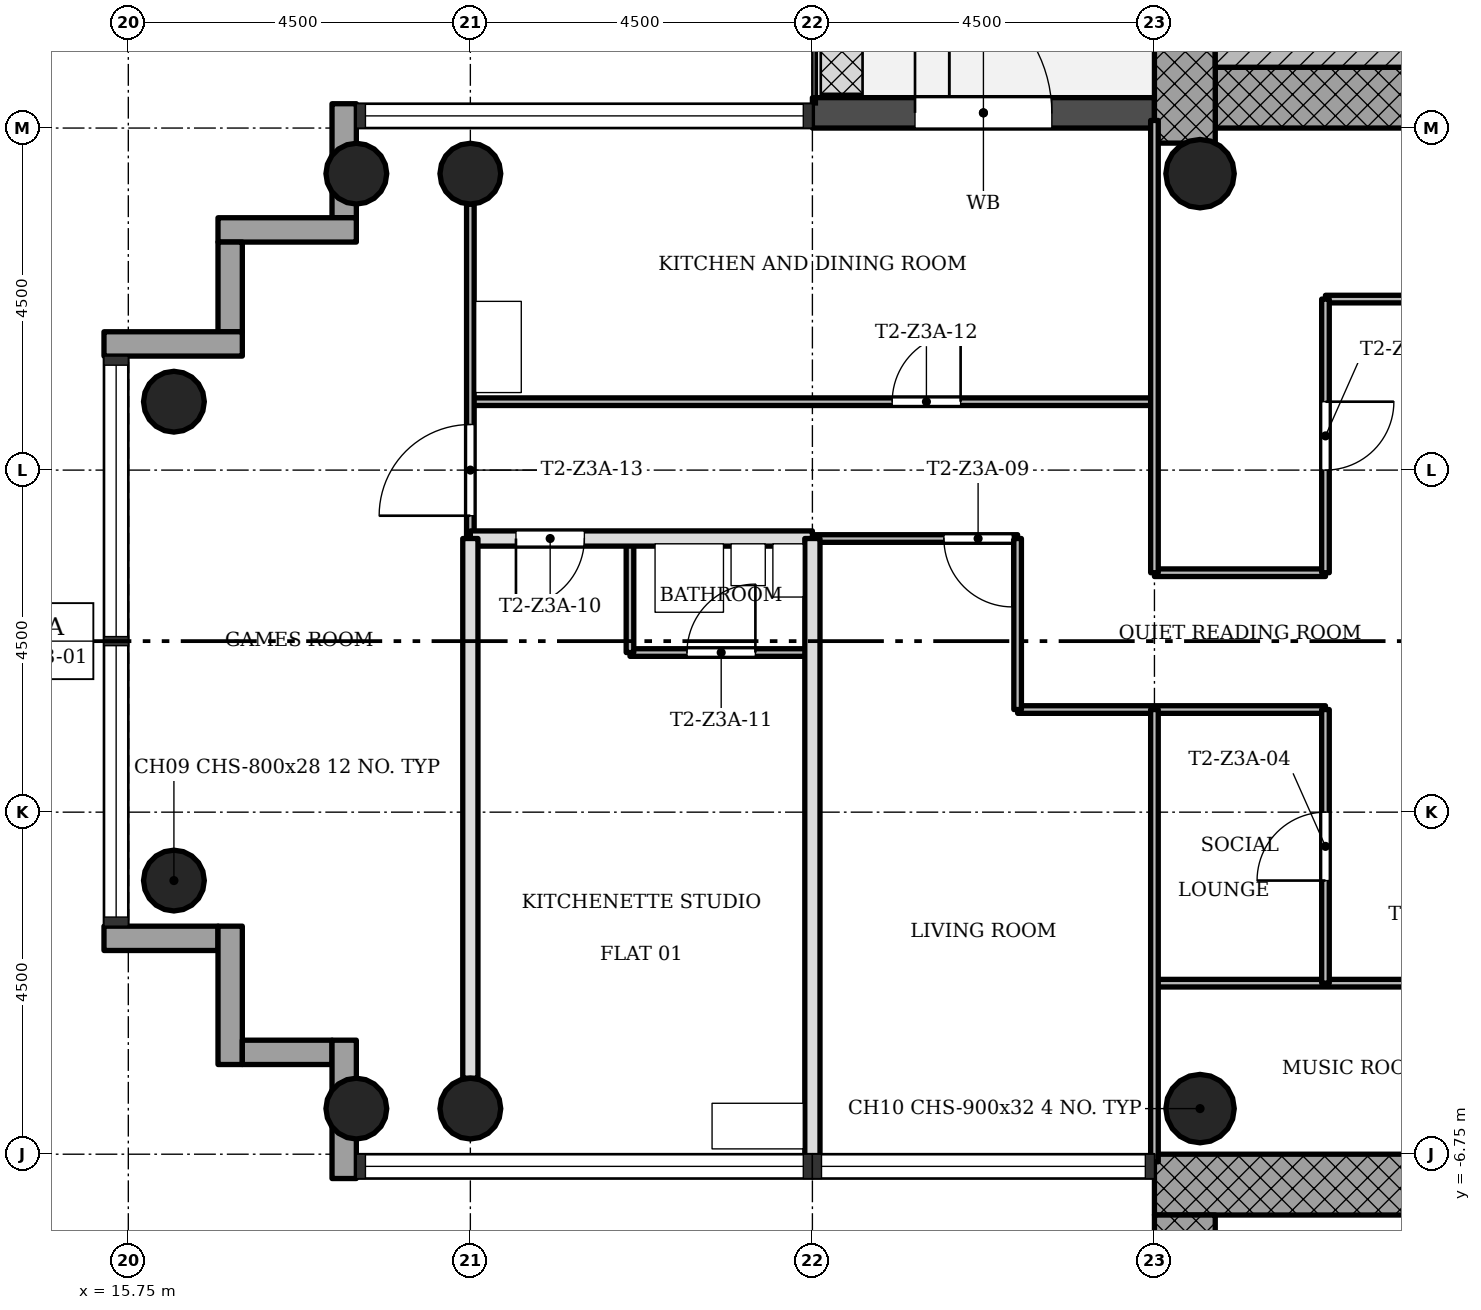
"""IFC4 building model, lengths in metres.
Left out: names, types, materials, properties, quantities, classifications, styles, units other than length and angle.
Written with IfcOpenShell. Run it as: python <this file> out.ifc"""

import sys

from ifc_helpers import new_model, si_unit, direction, frame, frame_2d, origin, origin_2d, place, context, subcontext, project, spatial, rectangle, hollow_circle, extrude, element, fill, save


model = new_model("IFC4")
c1 = context("Model", 3, precision=1e-05, world=origin(), true_north=direction((0.0, 1.0)))
c2 = subcontext(c1, "Body", "Model", "MODEL_VIEW")
j1 = project(units=[si_unit("LENGTHUNIT", "METRE"), si_unit("PLANEANGLEUNIT", "RADIAN")], contexts=[c1])
p1 = place(None, origin())
s1 = spatial("IfcSite", under=j1, at=p1, CompositionType="ELEMENT")
p2 = place(p1, origin())
s2 = spatial("IfcBuilding", under=s1, at=p2, CompositionType="ELEMENT")
p3 = place(p2, frame((0.0, 0.0, 140.5)))
s3 = spatial("IfcBuildingStorey", under=s2, at=p3, CompositionType="ELEMENT", Elevation=140.5)
p4 = place(p3, frame((30.05, 7.15, 0.0), z_axis=(0.0, 0.0, 1.0), x_axis=(1.0, 0.0, 0.0)))
e1 = element("IfcWall", 1, at=p4, inside=s3, PredefinedType="SHEAR", context=c2, shape_type="SweptSolid", body=[
    extrude(rectangle(XDim=12.7, YDim=0.8, at=frame_2d((6.35, 0.0))), origin(), (0.0, 0.0, 1.0), 3.4),
])
p5 = place(p4, frame((5.05, 0.0, 0.0)))
e2 = element("IfcOpeningElement", 2, at=p5, cuts=e1, PredefinedType="OPENING", context=c2, shape_type="SweptSolid", body=[
    extrude(rectangle(XDim=1.8, YDim=2.1, at=frame_2d((0.9, 1.05))), frame((0.0, 0.41, 0.0), z_axis=(0.0, -1.0, 0.0), x_axis=(1.0, 0.0, 0.0)), (0.0, 0.0, 1.0), 0.82),
])
p6 = place(p3, frame((29.65, 15.348, 0.0), z_axis=(0.0, 0.0, 1.0), x_axis=(0.0, -1.0, 0.0)))
e3 = element("IfcWall", 3, at=p6, inside=s3, PredefinedType="SHEAR", context=c2, shape_type="SweptSolid", body=[
    extrude(rectangle(XDim=8.796, YDim=0.8, at=frame_2d((4.398, 0.0))), origin(), (0.0, 0.0, 1.0), 3.4),
])
p7 = place(p3, frame((41.95, -7.15, 0.0), z_axis=(0.0, 0.0, 1.0), x_axis=(-1.0, 0.0, 0.0)))
e4 = element("IfcWall", 4, at=p7, inside=s3, PredefinedType="SHEAR", context=c2, shape_type="SweptSolid", body=[
    extrude(rectangle(XDim=12.7, YDim=0.8, at=frame_2d((6.35, 0.0))), origin(), (0.0, 0.0, 1.0), 3.4),
])
p8 = place(p7, frame((5.05, 0.0, 0.0)))
e5 = element("IfcOpeningElement", 5, at=p8, cuts=e4, PredefinedType="OPENING", context=c2, shape_type="SweptSolid", body=[
    extrude(rectangle(XDim=1.8, YDim=2.1, at=frame_2d((0.9, 1.05))), frame((0.0, 0.41, 0.0), z_axis=(0.0, -1.0, 0.0), x_axis=(1.0, 0.0, 0.0)), (0.0, 0.0, 1.0), 0.82),
])
p9 = place(p3, frame((29.65, -7.55, 0.0), z_axis=(0.0, 0.0, 1.0), x_axis=(0.0, -1.0, 0.0)))
e6 = element("IfcWall", 6, at=p9, inside=s3, PredefinedType="SHEAR", context=c2, shape_type="SweptSolid", body=[
    extrude(rectangle(XDim=8.2, YDim=0.8, at=frame_2d((4.1, 0.0))), origin(), (0.0, 0.0, 1.0), 3.4),
])
for number, where, z_axis, x_axis in (
    (7, (20.25, 6.15, 0.0), (0.0, 0.0, 1.0), (1.0, 0.0, 0.0)),
    (8, (20.25, -6.15, 0.0), (0.0, 0.0, 1.0), (1.0, 0.0, 0.0)),
    (9, (18.75, 6.15, 0.0), (0.0, 0.0, 1.0), (1.0, 0.0, 0.0)),
    (10, (18.75, -6.15, 0.0), (0.0, 0.0, 1.0), (1.0, 0.0, 0.0)),
    (11, (16.35, 3.15, 0.0), (0.0, 0.0, 1.0), (1.0, 0.0, 0.0)),
    (12, (16.35, -3.15, 0.0), (0.0, 0.0, 1.0), (1.0, 0.0, 0.0)),
):
    element("IfcColumn", number, at=place(p3, frame(where, z_axis=z_axis, x_axis=x_axis)), inside=s3, PredefinedType="COLUMN", context=c2, shape_type="SweptSolid", body=[
        extrude(hollow_circle(Radius=0.4, WallThickness=0.028, at=origin_2d()), origin(), (0.0, 0.0, 1.0), 3.4),
    ])
for number, where, z_axis, x_axis in (
    (13, (29.85, 6.15, 0.0), (0.0, 0.0, 1.0), (1.0, 0.0, 0.0)),
    (14, (29.85, -6.15, 0.0), (0.0, 0.0, 1.0), (1.0, 0.0, 0.0)),
):
    element("IfcColumn", number, at=place(p3, frame(where, z_axis=z_axis, x_axis=x_axis)), inside=s3, PredefinedType="COLUMN", context=c2, shape_type="SweptSolid", body=[
        extrude(hollow_circle(Radius=0.45, WallThickness=0.032, at=origin_2d()), origin(), (0.0, 0.0, 1.0), 3.4),
    ])
p10 = place(p3, frame((29.25, 6.95, -0.02), z_axis=(0.0, 0.0, 1.0), x_axis=(-1.0, 0.0, 0.0)))
e15 = element("IfcWall", 15, at=p10, inside=s3, PredefinedType="STANDARD", context=c2, shape_type="SweptSolid", body=[
    extrude(rectangle(XDim=4.5, YDim=0.4, at=frame_2d((2.25, 0.0))), origin(), (0.0, 0.0, 1.0), 3.12),
])
p11 = place(p10, frame((1.35, 0.0, 0.02)))
e16 = element("IfcOpeningElement", 16, at=p11, cuts=e15, PredefinedType="OPENING", context=c2, shape_type="SweptSolid", body=[
    extrude(rectangle(XDim=1.8, YDim=2.1, at=frame_2d((0.9, 1.05))), frame((0.0, 0.21, 0.0), z_axis=(0.0, -1.0, 0.0), x_axis=(1.0, 0.0, 0.0)), (0.0, 0.0, 1.0), 0.42),
])
p12 = place(p3, frame((18.59, 7.07, -0.3), z_axis=(0.0, 0.0, 1.0), x_axis=(0.0, -1.0, 0.0)))
e17 = element("IfcWall", 17, at=p12, inside=s3, PredefinedType="STANDARD", context=c2, shape_type="SweptSolid", body=[
    extrude(rectangle(XDim=1.5, YDim=0.32, at=frame_2d((0.75, 0.0))), origin(), (0.0, 0.0, 1.0), 3.4),
])
p13 = place(p3, frame((18.75, 5.41, -0.3), z_axis=(0.0, 0.0, 1.0), x_axis=(-1.0, 0.0, 0.0)))
e18 = element("IfcWall", 18, at=p13, inside=s3, PredefinedType="STANDARD", context=c2, shape_type="SweptSolid", body=[
    extrude(rectangle(XDim=1.82, YDim=0.32, at=frame_2d((0.91, 0.0))), origin(), (0.0, 0.0, 1.0), 3.4),
])
p14 = place(p3, frame((17.09, 5.25, -0.3), z_axis=(0.0, 0.0, 1.0), x_axis=(0.0, -1.0, 0.0)))
e19 = element("IfcWall", 19, at=p14, inside=s3, PredefinedType="STANDARD", context=c2, shape_type="SweptSolid", body=[
    extrude(rectangle(XDim=1.18, YDim=0.32, at=frame_2d((0.59, 0.0))), origin(), (0.0, 0.0, 1.0), 3.4),
])
p15 = place(p3, frame((17.25, 3.91, -0.3), z_axis=(0.0, 0.0, 1.0), x_axis=(-1.0, 0.0, 0.0)))
e20 = element("IfcWall", 20, at=p15, inside=s3, PredefinedType="STANDARD", context=c2, shape_type="SweptSolid", body=[
    extrude(rectangle(XDim=1.82, YDim=0.32, at=frame_2d((0.91, 0.0))), origin(), (0.0, 0.0, 1.0), 3.4),
])
p16 = place(p3, frame((15.43, -3.91, -0.3), z_axis=(0.0, 0.0, 1.0), x_axis=(1.0, 0.0, 0.0)))
e21 = element("IfcWall", 21, at=p16, inside=s3, PredefinedType="STANDARD", context=c2, shape_type="SweptSolid", body=[
    extrude(rectangle(XDim=1.5, YDim=0.32, at=frame_2d((0.75, 0.0))), origin(), (0.0, 0.0, 1.0), 3.4),
])
p17 = place(p3, frame((17.09, -3.75, -0.3), z_axis=(0.0, 0.0, 1.0), x_axis=(0.0, -1.0, 0.0)))
e22 = element("IfcWall", 22, at=p17, inside=s3, PredefinedType="STANDARD", context=c2, shape_type="SweptSolid", body=[
    extrude(rectangle(XDim=1.82, YDim=0.32, at=frame_2d((0.91, 0.0))), origin(), (0.0, 0.0, 1.0), 3.4),
])
p18 = place(p3, frame((17.25, -5.41, -0.3), z_axis=(0.0, 0.0, 1.0), x_axis=(1.0, 0.0, 0.0)))
e23 = element("IfcWall", 23, at=p18, inside=s3, PredefinedType="STANDARD", context=c2, shape_type="SweptSolid", body=[
    extrude(rectangle(XDim=1.18, YDim=0.32, at=frame_2d((0.59, 0.0))), origin(), (0.0, 0.0, 1.0), 3.4),
])
p19 = place(p3, frame((18.59, -5.25, -0.3), z_axis=(0.0, 0.0, 1.0), x_axis=(0.0, -1.0, 0.0)))
e24 = element("IfcWall", 24, at=p19, inside=s3, PredefinedType="STANDARD", context=c2, shape_type="SweptSolid", body=[
    extrude(rectangle(XDim=1.82, YDim=0.32, at=frame_2d((0.91, 0.0))), origin(), (0.0, 0.0, 1.0), 3.4),
])
p20 = place(p3, frame((34.5, -4.5, 0.0), z_axis=(0.0, 0.0, 1.0), x_axis=(-1.0, 0.0, 0.0)))
e25 = element("IfcWall", 25, at=p20, inside=s3, PredefinedType="PARTITIONING", context=c2, shape_type="SweptSolid", body=[
    extrude(rectangle(XDim=5.25, YDim=0.1, at=frame_2d((2.625, 0.0))), origin(), (0.0, 0.0, 1.0), 3.0),
])
p21 = place(p20, frame((1.05, 0.0, 0.0)))
e26 = element("IfcOpeningElement", 26, at=p21, cuts=e25, PredefinedType="OPENING", context=c2, shape_type="SweptSolid", body=[
    extrude(rectangle(XDim=0.9, YDim=2.1, at=frame_2d((0.45, 1.05))), frame((0.0, 0.06, 0.0), z_axis=(0.0, -1.0, 0.0), x_axis=(1.0, 0.0, 0.0)), (0.0, 0.0, 1.0), 0.12),
])
p22 = place(p3, frame((31.5, -0.9, 0.0), z_axis=(0.0, 0.0, 1.0), x_axis=(-1.0, 0.0, 0.0)))
e27 = element("IfcWall", 27, at=p22, inside=s3, PredefinedType="PARTITIONING", context=c2, shape_type="SweptSolid", body=[
    extrude(rectangle(XDim=4.05, YDim=0.1, at=frame_2d((2.025, 0.0))), origin(), (0.0, 0.0, 1.0), 3.0),
])
p23 = place(p3, frame((24.75, -0.15, 0.0), z_axis=(0.0, 0.0, 1.0), x_axis=(-1.0, 0.0, 0.0)))
e28 = element("IfcWall", 28, at=p23, inside=s3, PredefinedType="PARTITIONING", context=c2, shape_type="SweptSolid", body=[
    extrude(rectangle(XDim=2.4, YDim=0.1, at=frame_2d((1.2, 0.0))), origin(), (0.0, 0.0, 1.0), 3.0),
])
p24 = place(p23, frame((0.75, 0.0, 0.0)))
e29 = element("IfcOpeningElement", 29, at=p24, cuts=e28, PredefinedType="OPENING", context=c2, shape_type="SweptSolid", body=[
    extrude(rectangle(XDim=0.9, YDim=2.1, at=frame_2d((0.45, 1.05))), frame((0.0, 0.06, 0.0), z_axis=(0.0, -1.0, 0.0), x_axis=(1.0, 0.0, 0.0)), (0.0, 0.0, 1.0), 0.12),
])
p25 = place(p3, frame((31.5, 0.9, 0.0), z_axis=(0.0, 0.0, 1.0), x_axis=(-1.0, 0.0, 0.0)))
e30 = element("IfcWall", 30, at=p25, inside=s3, PredefinedType="PARTITIONING", context=c2, shape_type="SweptSolid", body=[
    extrude(rectangle(XDim=2.25, YDim=0.1, at=frame_2d((1.125, 0.0))), origin(), (0.0, 0.0, 1.0), 3.0),
])
p26 = place(p3, frame((27.45, 1.35, 0.0), z_axis=(0.0, 0.0, 1.0), x_axis=(-1.0, 0.0, 0.0)))
e31 = element("IfcWall", 31, at=p26, inside=s3, PredefinedType="PARTITIONING", context=c2, shape_type="SweptSolid", body=[
    extrude(rectangle(XDim=2.7, YDim=0.1, at=frame_2d((1.35, 0.0))), origin(), (0.0, 0.0, 1.0), 3.0),
])
p27 = place(p26, frame((0.07, 0.0, 0.0)))
e32 = element("IfcOpeningElement", 32, at=p27, cuts=e31, PredefinedType="OPENING", context=c2, shape_type="SweptSolid", body=[
    extrude(rectangle(XDim=0.9, YDim=2.1, at=frame_2d((0.45, 1.05))), frame((0.0, 0.06, 0.0), z_axis=(0.0, -1.0, 0.0), x_axis=(1.0, 0.0, 0.0)), (0.0, 0.0, 1.0), 0.12),
])
p28 = place(p3, frame((24.75, 1.35, 0.0), z_axis=(0.0, 0.0, 1.0), x_axis=(-1.0, 0.0, 0.0)))
e33 = element("IfcWall", 33, at=p28, inside=s3, PredefinedType="SOLIDWALL", context=c2, shape_type="SweptSolid", body=[
    extrude(rectangle(XDim=4.5, YDim=0.2, at=frame_2d((2.25, 0.0))), origin(), (0.0, 0.0, 1.0), 3.0),
])
p29 = place(p28, frame((3.0, 0.0, 0.0)))
e34 = element("IfcOpeningElement", 34, at=p29, cuts=e33, PredefinedType="OPENING", context=c2, shape_type="SweptSolid", body=[
    extrude(rectangle(XDim=0.9, YDim=2.1, at=frame_2d((0.45, 1.05))), frame((0.0, 0.11, 0.0), z_axis=(0.0, -1.0, 0.0), x_axis=(1.0, 0.0, 0.0)), (0.0, 0.0, 1.0), 0.22),
])
p30 = place(p3, frame((29.25, 3.15, 0.0), z_axis=(0.0, 0.0, 1.0), x_axis=(-1.0, 0.0, 0.0)))
e35 = element("IfcWall", 35, at=p30, inside=s3, PredefinedType="PARTITIONING", context=c2, shape_type="SweptSolid", body=[
    extrude(rectangle(XDim=9.0, YDim=0.1, at=frame_2d((4.5, 0.0))), origin(), (0.0, 0.0, 1.0), 3.0),
])
p31 = place(p30, frame((2.55, 0.0, 0.0)))
e36 = element("IfcOpeningElement", 36, at=p31, cuts=e35, PredefinedType="OPENING", context=c2, shape_type="SweptSolid", body=[
    extrude(rectangle(XDim=0.9, YDim=2.1, at=frame_2d((0.45, 1.05))), frame((0.0, 0.06, 0.0), z_axis=(0.0, -1.0, 0.0), x_axis=(1.0, 0.0, 0.0)), (0.0, 0.0, 1.0), 0.12),
])
p32 = place(p3, frame((34.5, 4.5, 0.0), z_axis=(0.0, 0.0, 1.0), x_axis=(-1.0, 0.0, 0.0)))
e37 = element("IfcWall", 37, at=p32, inside=s3, PredefinedType="PARTITIONING", context=c2, shape_type="SweptSolid", body=[
    extrude(rectangle(XDim=3.0, YDim=0.1, at=frame_2d((1.5, 0.0))), origin(), (0.0, 0.0, 1.0), 3.0),
])
p33 = place(p3, frame((31.5, -4.5, 0.0), z_axis=(0.0, 0.0, 1.0), x_axis=(0.0, 1.0, 0.0)))
e38 = element("IfcWall", 38, at=p33, inside=s3, PredefinedType="PARTITIONING", context=c2, shape_type="SweptSolid", body=[
    extrude(rectangle(XDim=3.6, YDim=0.1, at=frame_2d((1.8, 0.0))), origin(), (0.0, 0.0, 1.0), 3.0),
])
p34 = place(p33, frame((1.35, 0.0, 0.0)))
e39 = element("IfcOpeningElement", 39, at=p34, cuts=e38, PredefinedType="OPENING", context=c2, shape_type="SweptSolid", body=[
    extrude(rectangle(XDim=0.9, YDim=2.1, at=frame_2d((0.45, 1.05))), frame((0.0, 0.06, 0.0), z_axis=(0.0, -1.0, 0.0), x_axis=(1.0, 0.0, 0.0)), (0.0, 0.0, 1.0), 0.12),
])
p35 = place(p3, frame((31.5, 0.9, 0.0), z_axis=(0.0, 0.0, 1.0), x_axis=(0.0, 1.0, 0.0)))
e40 = element("IfcWall", 40, at=p35, inside=s3, PredefinedType="PARTITIONING", context=c2, shape_type="SweptSolid", body=[
    extrude(rectangle(XDim=3.6, YDim=0.1, at=frame_2d((1.8, 0.0))), origin(), (0.0, 0.0, 1.0), 3.0),
])
p36 = place(p35, frame((1.35, 0.0, 0.0)))
e41 = element("IfcOpeningElement", 41, at=p36, cuts=e40, PredefinedType="OPENING", context=c2, shape_type="SweptSolid", body=[
    extrude(rectangle(XDim=0.9, YDim=2.1, at=frame_2d((0.45, 1.05))), frame((0.0, 0.06, 0.0), z_axis=(0.0, -1.0, 0.0), x_axis=(1.0, 0.0, 0.0)), (0.0, 0.0, 1.0), 0.12),
])
for number, where, z_axis, x_axis in (
    (42, (29.25, -6.85, 0.0), (0.0, 0.0, 1.0), (0.0, 1.0, 0.0)),
    (43, (29.25, 0.9, 0.0), (0.0, 0.0, 1.0), (0.0, 1.0, 0.0)),
):
    element("IfcWall", number, at=place(p3, frame(where, z_axis=z_axis, x_axis=x_axis)), inside=s3, PredefinedType="PARTITIONING", context=c2, shape_type="SweptSolid", body=[
        extrude(rectangle(XDim=5.95, YDim=0.1, at=frame_2d((2.975, 0.0))), origin(), (0.0, 0.0, 1.0), 3.0),
    ])
p37 = place(p3, frame((27.45, -0.9, 0.0), z_axis=(0.0, 0.0, 1.0), x_axis=(0.0, 1.0, 0.0)))
e44 = element("IfcWall", 44, at=p37, inside=s3, PredefinedType="PARTITIONING", context=c2, shape_type="SweptSolid", body=[
    extrude(rectangle(XDim=2.25, YDim=0.1, at=frame_2d((1.125, 0.0))), origin(), (0.0, 0.0, 1.0), 3.0),
])
p38 = place(p3, frame((24.75, -6.85, 0.0), z_axis=(0.0, 0.0, 1.0), x_axis=(0.0, 1.0, 0.0)))
e45 = element("IfcWall", 45, at=p38, inside=s3, PredefinedType="SOLIDWALL", context=c2, shape_type="SweptSolid", body=[
    extrude(rectangle(XDim=8.2, YDim=0.2, at=frame_2d((4.1, 0.0))), origin(), (0.0, 0.0, 1.0), 3.0),
])
p39 = place(p3, frame((22.35, -0.15, 0.0), z_axis=(0.0, 0.0, 1.0), x_axis=(0.0, 1.0, 0.0)))
e46 = element("IfcWall", 46, at=p39, inside=s3, PredefinedType="PARTITIONING", context=c2, shape_type="SweptSolid", body=[
    extrude(rectangle(XDim=1.5, YDim=0.1, at=frame_2d((0.75, 0.0))), origin(), (0.0, 0.0, 1.0), 3.0),
])
p40 = place(p3, frame((20.25, 1.35, 0.0), z_axis=(0.0, 0.0, 1.0), x_axis=(0.0, 1.0, 0.0)))
e47 = element("IfcWall", 47, at=p40, inside=s3, PredefinedType="PARTITIONING", context=c2, shape_type="SweptSolid", body=[
    extrude(rectangle(XDim=4.4, YDim=0.1, at=frame_2d((2.2, 0.0))), origin(), (0.0, 0.0, 1.0), 3.0),
])
p41 = place(p40, frame((0.3, 0.0, 0.0)))
e48 = element("IfcOpeningElement", 48, at=p41, cuts=e47, PredefinedType="OPENING", context=c2, shape_type="SweptSolid", body=[
    extrude(rectangle(XDim=1.2, YDim=2.1, at=frame_2d((0.6, 1.05))), frame((0.0, 0.06, 0.0), z_axis=(0.0, -1.0, 0.0), x_axis=(1.0, 0.0, 0.0)), (0.0, 0.0, 1.0), 0.12),
])
p42 = place(p3, frame((20.25, -5.75, 0.0), z_axis=(0.0, 0.0, 1.0), x_axis=(0.0, 1.0, 0.0)))
e49 = element("IfcWall", 49, at=p42, inside=s3, PredefinedType="SOLIDWALL", context=c2, shape_type="SweptSolid", body=[
    extrude(rectangle(XDim=7.1, YDim=0.2, at=frame_2d((3.55, 0.0))), origin(), (0.0, 0.0, 1.0), 3.0),
])
p43 = place(p3, frame((34.15, 7.75, 0.0), z_axis=(0.0, 0.0, 1.0), x_axis=(-1.0, 0.0, 0.0)))
e50 = element("IfcWall", 50, at=p43, inside=s3, PredefinedType="SHEAR", context=c2, shape_type="SweptSolid", body=[
    extrude(rectangle(XDim=4.1, YDim=0.4, at=frame_2d((2.05, 0.0))), origin(), (0.0, 0.0, 1.0), 3.4),
])
p44 = place(p11, origin())
e51 = element("IfcDoor", 51, at=p44, inside=s3, OperationType="SINGLE_SWING_RIGHT", PredefinedType="DOOR", context=c2, shape_type="SweptSolid", body=[
    extrude(rectangle(XDim=1.8, YDim=2.1, at=frame_2d((0.9, 1.05))), frame((0.0, 0.025, 0.0), z_axis=(0.0, -1.0, 0.0), x_axis=(1.0, 0.0, 0.0)), (0.0, 0.0, 1.0), 0.05),
])
fill(e16, e51)
p45 = place(p36, origin())
e52 = element("IfcDoor", 52, at=p45, inside=s3, OperationType="SINGLE_SWING_RIGHT", PredefinedType="DOOR", context=c2, shape_type="SweptSolid", body=[
    extrude(rectangle(XDim=0.9, YDim=2.1, at=frame_2d((0.45, 1.05))), frame((0.0, 0.025, 0.0), z_axis=(0.0, -1.0, 0.0), x_axis=(1.0, 0.0, 0.0)), (0.0, 0.0, 1.0), 0.05),
])
fill(e41, e52)
p46 = place(p34, origin())
e53 = element("IfcDoor", 53, at=p46, inside=s3, OperationType="SINGLE_SWING_RIGHT", PredefinedType="DOOR", context=c2, shape_type="SweptSolid", body=[
    extrude(rectangle(XDim=0.9, YDim=2.1, at=frame_2d((0.45, 1.05))), frame((0.0, 0.025, 0.0), z_axis=(0.0, -1.0, 0.0), x_axis=(1.0, 0.0, 0.0)), (0.0, 0.0, 1.0), 0.05),
])
fill(e39, e53)
p47 = place(p27, origin())
e54 = element("IfcDoor", 54, at=p47, inside=s3, OperationType="SINGLE_SWING_RIGHT", PredefinedType="DOOR", context=c2, shape_type="SweptSolid", body=[
    extrude(rectangle(XDim=0.9, YDim=2.1, at=frame_2d((0.45, 1.05))), frame((0.0, 0.025, 0.0), z_axis=(0.0, -1.0, 0.0), x_axis=(1.0, 0.0, 0.0)), (0.0, 0.0, 1.0), 0.05),
])
fill(e32, e54)
p48 = place(p29, origin())
e55 = element("IfcDoor", 55, at=p48, inside=s3, OperationType="SINGLE_SWING_LEFT", PredefinedType="DOOR", context=c2, shape_type="SweptSolid", body=[
    extrude(rectangle(XDim=0.9, YDim=2.1, at=frame_2d((0.45, 1.05))), frame((0.0, 0.025, 0.0), z_axis=(0.0, -1.0, 0.0), x_axis=(1.0, 0.0, 0.0)), (0.0, 0.0, 1.0), 0.05),
])
fill(e34, e55)
p49 = place(p24, origin())
e56 = element("IfcDoor", 56, at=p49, inside=s3, OperationType="SINGLE_SWING_LEFT", PredefinedType="DOOR", context=c2, shape_type="SweptSolid", body=[
    extrude(rectangle(XDim=0.9, YDim=2.1, at=frame_2d((0.45, 1.05))), frame((0.0, 0.025, 0.0), z_axis=(0.0, -1.0, 0.0), x_axis=(1.0, 0.0, 0.0)), (0.0, 0.0, 1.0), 0.05),
])
fill(e29, e56)
p50 = place(p31, origin())
e57 = element("IfcDoor", 57, at=p50, inside=s3, OperationType="SINGLE_SWING_LEFT", PredefinedType="DOOR", context=c2, shape_type="SweptSolid", body=[
    extrude(rectangle(XDim=0.9, YDim=2.1, at=frame_2d((0.45, 1.05))), frame((0.0, 0.025, 0.0), z_axis=(0.0, -1.0, 0.0), x_axis=(1.0, 0.0, 0.0)), (0.0, 0.0, 1.0), 0.05),
])
fill(e36, e57)
p51 = place(p41, origin())
e58 = element("IfcDoor", 58, at=p51, inside=s3, OperationType="SINGLE_SWING_RIGHT", PredefinedType="DOOR", context=c2, shape_type="SweptSolid", body=[
    extrude(rectangle(XDim=1.2, YDim=2.1, at=frame_2d((0.6, 1.05))), frame((0.0, 0.025, 0.0), z_axis=(0.0, -1.0, 0.0), x_axis=(1.0, 0.0, 0.0)), (0.0, 0.0, 1.0), 0.05),
])
fill(e48, e58)
save(model, sys.argv[1])
